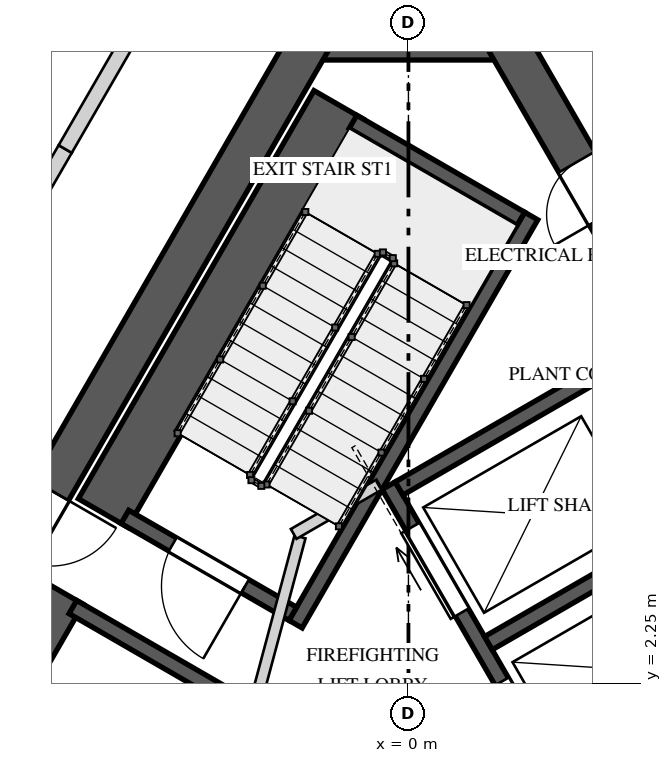
"""IFC4 building model, lengths in metres.
Left out: names, types, materials, properties, quantities, classifications, styles, units other than length and angle.
Written with IfcOpenShell. Run it as: python <this file> out.ifc"""

import sys

from ifc_helpers import new_model, si_unit, direction, frame, frame_2d, origin, place, context, subcontext, project, spatial, polyline, rectangle, outline, extrude, element, fill, save


model = new_model("IFC4")
c1 = context("Model", 3, precision=1e-05, world=origin(), true_north=direction((0.0, 1.0)))
c2 = subcontext(c1, "Body", "Model", "MODEL_VIEW")
j1 = project(units=[si_unit("LENGTHUNIT", "METRE"), si_unit("PLANEANGLEUNIT", "RADIAN")], contexts=[c1])
p1 = place(None, origin())
s1 = spatial("IfcSite", under=j1, at=p1, CompositionType="ELEMENT")
p2 = place(p1, origin())
s2 = spatial("IfcBuilding", under=s1, at=p2, CompositionType="ELEMENT")
p3 = place(p2, frame((0.0, 0.0, 352.4)))
s3 = spatial("IfcBuildingStorey", under=s2, at=p3, CompositionType="ELEMENT", Elevation=352.4)
p4 = place(p3, frame((1.443, 10.725, 0.0), z_axis=(0.0, 0.0, 1.0), x_axis=(-1.0, 0.0, 0.0)))
e1 = element("IfcWall", 1, at=p4, inside=s3, PredefinedType="SHEAR", context=c2, shape_type="SweptSolid", body=[
    extrude(rectangle(XDim=2.887, YDim=0.55, at=frame_2d((1.443, 0.0))), origin(), (0.0, 0.0, 1.0), 4.5),
])
p5 = place(p3, frame((-1.285, 10.725, 0.0), z_axis=(0.0, 0.0, 1.0), x_axis=(-0.499994590896, -0.86602852671, 0.0)))
e2 = element("IfcWall", 2, at=p5, inside=s3, PredefinedType="SHEAR", context=c2, shape_type="SweptSolid", body=[
    extrude(rectangle(XDim=17.292, YDim=0.55, at=frame_2d((8.646, 0.0))), origin(), (0.0, 0.0, 1.0), 4.5),
])
p6 = place(p5, frame((6.851, 0.0, 0.0)))
e3 = element("IfcOpeningElement", 3, at=p6, cuts=e2, PredefinedType="OPENING", context=c2, shape_type="SweptSolid", body=[
    extrude(rectangle(XDim=1.0, YDim=2.4, at=frame_2d((0.5, 1.2))), frame((0.0, 0.285, 0.0), z_axis=(0.0, -1.0, 0.0), x_axis=(1.0, 0.0, 0.0)), (0.0, 0.0, 1.0), 0.57),
])
p7 = place(p3, frame((9.93, -4.25, 0.0), z_axis=(0.0, 0.0, 1.0), x_axis=(-0.499994590896, 0.86602852671, 0.0)))
e4 = element("IfcWall", 4, at=p7, inside=s3, PredefinedType="SHEAR", context=c2, shape_type="SweptSolid", body=[
    extrude(rectangle(XDim=17.292, YDim=0.55, at=frame_2d((8.646, 0.0))), origin(), (0.0, 0.0, 1.0), 4.5),
])
p8 = place(p7, frame((6.921, 0.0, 0.0)))
e5 = element("IfcOpeningElement", 5, at=p8, cuts=e4, PredefinedType="OPENING", context=c2, shape_type="SweptSolid", body=[
    extrude(rectangle(XDim=1.0, YDim=2.4, at=frame_2d((0.5, 1.2))), frame((0.0, 0.285, 0.0), z_axis=(0.0, -1.0, 0.0), x_axis=(1.0, 0.0, 0.0)), (0.0, 0.0, 1.0), 0.57),
])
p9 = place(p7, frame((14.626, 0.0, 0.0)))
e6 = element("IfcOpeningElement", 6, at=p9, cuts=e4, PredefinedType="OPENING", context=c2, shape_type="SweptSolid", body=[
    extrude(rectangle(XDim=0.8, YDim=2.1, at=frame_2d((0.4, 1.05))), frame((0.0, 0.285, 0.0), z_axis=(0.0, -1.0, 0.0), x_axis=(1.0, 0.0, 0.0)), (0.0, 0.0, 1.0), 0.57),
])
p10 = place(p3, frame((-0.918, 9.86, 0.0), z_axis=(0.0, 0.0, 1.0), x_axis=(-0.500026960575, -0.86600983753, 0.0)))
e7 = element("IfcWall", 7, at=p10, inside=s3, PredefinedType="SOLIDWALL", context=c2, shape_type="SweptSolid", body=[
    extrude(rectangle(XDim=6.2, YDim=0.75, at=frame_2d((3.1, 0.0))), origin(), (0.0, 0.0, 1.0), 4.15),
])
p11 = place(p3, frame((1.615, 8.397, 0.0), z_axis=(0.0, 0.0, 1.0), x_axis=(-0.500009909098, -0.866019682689, 0.0)))
e8 = element("IfcWall", 8, at=p11, inside=s3, PredefinedType="SOLIDWALL", context=c2, shape_type="SweptSolid", body=[
    extrude(rectangle(XDim=6.2, YDim=0.2, at=frame_2d((3.1, 0.0))), origin(), (0.0, 0.0, 1.0), 4.15),
])
p12 = place(p3, frame((1.479, 8.361, 0.0), z_axis=(0.0, 0.0, 1.0), x_axis=(-0.865989465428, 0.500062241894, 0.0)))
e9 = element("IfcWall", 9, at=p12, inside=s3, PredefinedType="SOLIDWALL", context=c2, shape_type="SweptSolid", body=[
    extrude(rectangle(XDim=2.55, YDim=0.2, at=frame_2d((1.275, 0.0))), origin(), (0.0, 0.0, 1.0), 4.15),
])
p13 = place(p3, frame((-1.521, 3.165, 0.0), z_axis=(0.0, 0.0, 1.0), x_axis=(-0.866030925526, 0.499990435942, 0.0)))
e10 = element("IfcWall", 10, at=p13, inside=s3, PredefinedType="SOLIDWALL", context=c2, shape_type="SweptSolid", body=[
    extrude(rectangle(XDim=2.55, YDim=0.2, at=frame_2d((1.275, 0.0))), origin(), (0.0, 0.0, 1.0), 4.15),
])
p14 = place(p13, frame((0.725, 0.0, 0.0)))
e11 = element("IfcOpeningElement", 11, at=p14, cuts=e10, PredefinedType="OPENING", context=c2, shape_type="SweptSolid", body=[
    extrude(rectangle(XDim=1.1, YDim=2.4, at=frame_2d((0.55, 1.2))), frame((0.0, 0.11, 0.0), z_axis=(0.0, -1.0, 0.0), x_axis=(1.0, 0.0, 0.0)), (0.0, 0.0, 1.0), 0.22),
])
p15 = place(p3, frame((-4.603, 3.477, 0.0), z_axis=(0.0, 0.0, 1.0), x_axis=(-0.500015767406, -0.866016300277, 0.0)))
e12 = element("IfcWall", 12, at=p15, inside=s3, PredefinedType="SOLIDWALL", context=c2, shape_type="SweptSolid", body=[
    extrude(rectangle(XDim=5.5, YDim=0.75, at=frame_2d((2.75, 0.0))), origin(), (0.0, 0.0, 1.0), 4.15),
])
p16 = place(p3, frame((-2.38, 2.078, 0.0), z_axis=(0.0, 0.0, 1.0), x_axis=(-0.866061024631, 0.499938297808, 0.0)))
e13 = element("IfcWall", 13, at=p16, inside=s3, PredefinedType="SOLIDWALL", context=c2, shape_type="SweptSolid", body=[
    extrude(rectangle(XDim=2.35, YDim=0.2, at=frame_2d((1.175, 0.0))), origin(), (0.0, 0.0, 1.0), 4.15),
])
p17 = place(p3, frame((2.19, 0.606, 0.0), z_axis=(0.0, 0.0, 1.0), x_axis=(-0.500002801628, 0.866023786258, 0.0)))
e14 = element("IfcWall", 14, at=p17, inside=s3, PredefinedType="SOLIDWALL", context=c2, shape_type="SweptSolid", body=[
    extrude(rectangle(XDim=4.9, YDim=0.2, at=frame_2d((2.45, 0.0))), origin(), (0.0, 0.0, 1.0), 4.15),
])
p18 = place(p17, frame((0.625, 0.0, 0.0)))
e15 = element("IfcOpeningElement", 15, at=p18, cuts=e14, PredefinedType="OPENING", context=c2, shape_type="SweptSolid", body=[
    extrude(rectangle(XDim=1.3, YDim=2.1, at=frame_2d((0.65, 1.05))), frame((0.0, 0.11, 0.0), z_axis=(0.0, -1.0, 0.0), x_axis=(1.0, 0.0, 0.0)), (0.0, 0.0, 1.0), 0.22),
])
p19 = place(p17, frame((2.975, 0.0, 0.0)))
e16 = element("IfcOpeningElement", 16, at=p19, cuts=e14, PredefinedType="OPENING", context=c2, shape_type="SweptSolid", body=[
    extrude(rectangle(XDim=1.3, YDim=2.1, at=frame_2d((0.65, 1.05))), frame((0.0, 0.11, 0.0), z_axis=(0.0, -1.0, 0.0), x_axis=(1.0, 0.0, 0.0)), (0.0, 0.0, 1.0), 0.22),
])
for number, where, z_axis, x_axis in (
    (17, (2.227, 0.743, 0.0), (0.0, 0.0, 1.0), (0.866, 0.5, 0.0)),
    (18, (1.052, 2.778, 0.0), (0.0, 0.0, 1.0), (0.866, 0.5, 0.0)),
    (19, (-0.123, 4.813, 0.0), (0.0, 0.0, 1.0), (0.866, 0.5, 0.0)),
):
    element("IfcWall", number, at=place(p3, frame(where, z_axis=z_axis, x_axis=x_axis)), inside=s3, PredefinedType="SOLIDWALL", context=c2, shape_type="SweptSolid", body=[
        extrude(rectangle(XDim=3.15, YDim=0.2, at=frame_2d((1.575, 0.0))), origin(), (0.0, 0.0, 1.0), 4.15),
    ])
p20 = place(p3, frame((-2.178, 1.372, 0.0), z_axis=(0.0, 0.0, 1.0), x_axis=(0.258808958833, 0.96592852884, 0.0)))
e20 = element("IfcWall", 20, at=p20, inside=s3, PredefinedType="PARTITIONING", context=c2, shape_type="SweptSolid", body=[
    extrude(rectangle(XDim=2.903, YDim=0.15, at=frame_2d((1.451, 0.0))), origin(), (0.0, 0.0, 1.0), 4.15),
])
p21 = place(p3, frame((-1.51, 4.215, 0.0), z_axis=(0.0, 0.0, 1.0), x_axis=(0.866085525409, 0.49989585183, 0.0)))
e21 = element("IfcWall", 21, at=p21, inside=s3, PredefinedType="PARTITIONING", context=c2, shape_type="SweptSolid", body=[
    extrude(rectangle(XDim=1.3, YDim=0.15, at=frame_2d((0.65, 0.0))), origin(), (0.0, 0.0, 1.0), 4.15),
])
p22 = place(p3, frame((-5.484, 7.602, 0.0), z_axis=(0.0, 0.0, 1.0), x_axis=(0.500002486184, 0.866023968381, 0.0)))
e22 = element("IfcWall", 22, at=p22, inside=s3, PredefinedType="SOLIDWALL", context=c2, shape_type="SweptSolid", body=[
    extrude(outline(polyline([(0.0, 0.0), (1.937, 0.0), (1.937, 3.45), (1.111, 3.45), (1.111, 4.15), (0.0, 4.15), (0.0, 0.0)])), frame((0.0, 0.1, 0.0), z_axis=(0.0, -1.0, 0.0), x_axis=(1.0, 0.0, 0.0)), (0.0, 0.0, 1.0), 0.2),
])
p23 = place(p22, frame((0.05, 0.0, 0.0)))
e23 = element("IfcOpeningElement", 23, at=p23, cuts=e22, PredefinedType="OPENING", context=c2, shape_type="SweptSolid", body=[
    extrude(rectangle(XDim=1.1, YDim=2.4, at=frame_2d((0.55, 1.2))), frame((0.0, 0.11, 0.0), z_axis=(0.0, -1.0, 0.0), x_axis=(1.0, 0.0, 0.0)), (0.0, 0.0, 1.0), 0.22),
])
p24 = place(p3, frame((-4.515, 9.279, 0.0), z_axis=(0.0, 0.0, 1.0), x_axis=(0.499975428181, 0.866039589866, 0.0)))
e24 = element("IfcWall", 24, at=p24, inside=s3, PredefinedType="SOLIDWALL", context=c2, shape_type="SweptSolid", body=[
    extrude(rectangle(XDim=4.066, YDim=0.2, at=frame_2d((2.033, 0.0))), origin(), (0.0, 0.0, 1.0), 4.15),
])
p25 = place(p3, frame((2.483, 12.8, 0.0), z_axis=(0.0, 0.0, 1.0), x_axis=(0.499964726069, -0.86604576824, 0.0)))
e25 = element("IfcWall", 25, at=p25, inside=s3, PredefinedType="SOLIDWALL", context=c2, shape_type="SweptSolid", body=[
    extrude(rectangle(XDim=3.198, YDim=0.2, at=frame_2d((1.599, 0.0))), origin(), (0.0, 0.0, 1.0), 4.15),
])
p26 = place(p14, origin())
e26 = element("IfcDoor", 26, at=p26, inside=s3, OperationType="SINGLE_SWING_RIGHT", PredefinedType="DOOR", context=c2, shape_type="SweptSolid", body=[
    extrude(rectangle(XDim=1.1, YDim=2.4, at=frame_2d((0.55, 1.2))), frame((0.0, 0.025, 0.0), z_axis=(0.0, -1.0, 0.0), x_axis=(1.0, 0.0, 0.0)), (0.0, 0.0, 1.0), 0.05),
])
fill(e11, e26)
p27 = place(p18, origin())
e27 = element("IfcDoor", 27, at=p27, inside=s3, OperationType="SLIDING_TO_LEFT", PredefinedType="DOOR", context=c2, shape_type="SweptSolid", body=[
    extrude(rectangle(XDim=1.3, YDim=2.1, at=frame_2d((0.65, 1.05))), frame((0.0, 0.025, 0.0), z_axis=(0.0, -1.0, 0.0), x_axis=(1.0, 0.0, 0.0)), (0.0, 0.0, 1.0), 0.05),
])
fill(e15, e27)
p28 = place(p19, origin())
e28 = element("IfcDoor", 28, at=p28, inside=s3, OperationType="SLIDING_TO_RIGHT", PredefinedType="DOOR", context=c2, shape_type="SweptSolid", body=[
    extrude(rectangle(XDim=1.3, YDim=2.1, at=frame_2d((0.65, 1.05))), frame((0.0, 0.025, 0.0), z_axis=(0.0, -1.0, 0.0), x_axis=(1.0, 0.0, 0.0)), (0.0, 0.0, 1.0), 0.05),
])
fill(e16, e28)
p29 = place(p9, origin())
e29 = element("IfcDoor", 29, at=p29, inside=s3, OperationType="SINGLE_SWING_RIGHT", PredefinedType="DOOR", context=c2, shape_type="SweptSolid", body=[
    extrude(rectangle(XDim=0.8, YDim=2.1, at=frame_2d((0.4, 1.05))), frame((0.0, 0.025, 0.0), z_axis=(0.0, -1.0, 0.0), x_axis=(1.0, 0.0, 0.0)), (0.0, 0.0, 1.0), 0.05),
])
fill(e6, e29)
save(model, sys.argv[1])
